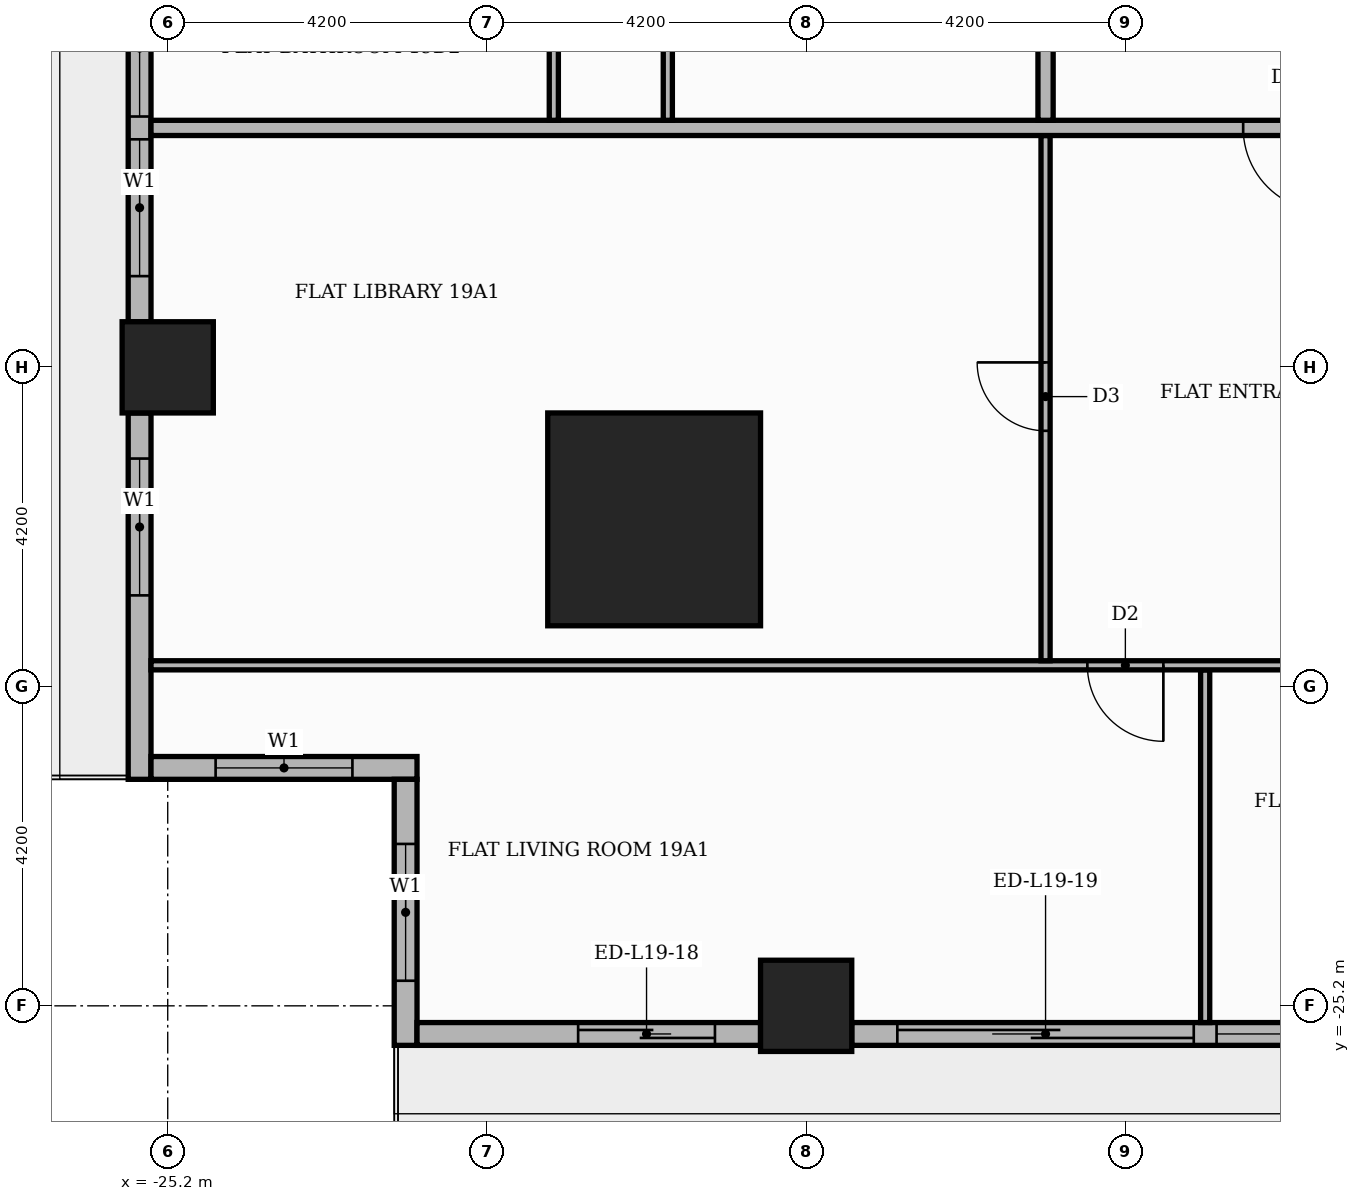
"""IFC4 building model, lengths in metres.
Left out: names, types, materials, properties, quantities, classifications, styles, units other than length and angle.
Written with IfcOpenShell. Run it as: python <this file> out.ifc"""

import sys

from ifc_helpers import new_model, si_unit, direction, frame, frame_2d, origin, origin_2d, place, context, subcontext, project, spatial, rectangle, extrude, element, fill, save


model = new_model("IFC4")
c1 = context("Model", 3, precision=1e-05, world=origin(), true_north=direction((0.0, 1.0)))
c2 = subcontext(c1, "Body", "Model", "MODEL_VIEW")
j1 = project(units=[si_unit("LENGTHUNIT", "METRE"), si_unit("PLANEANGLEUNIT", "RADIAN")], contexts=[c1])
p1 = place(None, origin())
s1 = spatial("IfcSite", under=j1, at=p1, CompositionType="ELEMENT")
p2 = place(p1, origin())
s2 = spatial("IfcBuilding", under=s1, at=p2, CompositionType="ELEMENT")
p3 = place(p2, frame((0.0, 0.0, 83.1)))
s3 = spatial("IfcBuildingStorey", under=s2, at=p3, CompositionType="ELEMENT", Elevation=83.1)
p4 = place(p3, frame((-18.8, -18.8, 0.0), z_axis=(0.0, 0.0, 1.0), x_axis=(1.0, 0.0, 0.0)))
e1 = element("IfcColumn", 1, at=p4, inside=s3, PredefinedType="COLUMN", context=c2, shape_type="SweptSolid", body=[
    extrude(rectangle(XDim=2.8, YDim=2.8, at=origin_2d()), origin(), (0.0, 0.0, 1.0), 3.9),
])
for number, where, z_axis, x_axis in (
    (2, (-16.8, -25.2, 0.0), (0.0, 0.0, 1.0), (1.0, 0.0, 0.0)),
    (3, (-25.2, -16.8, 0.0), (0.0, 0.0, 1.0), (1.0, 0.0, 0.0)),
):
    element("IfcColumn", number, at=place(p3, frame(where, z_axis=z_axis, x_axis=x_axis)), inside=s3, PredefinedType="COLUMN", context=c2, shape_type="SweptSolid", body=[
        extrude(rectangle(XDim=1.2, YDim=1.2, at=origin_2d()), origin(), (0.0, 0.0, 1.0), 3.9),
    ])
p5 = place(p3, frame((-25.57, -9.0, 0.0), z_axis=(0.0, 0.0, 1.0), x_axis=(0.0, -1.0, 0.0)))
e4 = element("IfcWall", 4, at=p5, inside=s3, PredefinedType="STANDARD", context=c2, shape_type="SweptSolid", body=[
    extrude(rectangle(XDim=7.2, YDim=0.3, at=frame_2d((3.6, 0.0))), origin(), (0.0, 0.0, 1.0), 3.48),
])
p6 = place(p5, frame((0.6, 0.0, 0.9)))
e5 = element("IfcOpeningElement", 5, at=p6, cuts=e4, PredefinedType="OPENING", context=c2, shape_type="SweptSolid", body=[
    extrude(rectangle(XDim=1.8, YDim=2.1, at=frame_2d((0.9, 1.05))), frame((0.0, 0.16, 0.0), z_axis=(0.0, -1.0, 0.0), x_axis=(1.0, 0.0, 0.0)), (0.0, 0.0, 1.0), 0.32),
])
p7 = place(p5, frame((2.7, 0.0, 0.9)))
e6 = element("IfcOpeningElement", 6, at=p7, cuts=e4, PredefinedType="OPENING", context=c2, shape_type="SweptSolid", body=[
    extrude(rectangle(XDim=1.8, YDim=2.1, at=frame_2d((0.9, 1.05))), frame((0.0, 0.16, 0.0), z_axis=(0.0, -1.0, 0.0), x_axis=(1.0, 0.0, 0.0)), (0.0, 0.0, 1.0), 0.32),
])
p8 = place(p5, frame((4.8, 0.0, 0.9)))
e7 = element("IfcOpeningElement", 7, at=p8, cuts=e4, PredefinedType="OPENING", context=c2, shape_type="SweptSolid", body=[
    extrude(rectangle(XDim=1.8, YDim=2.1, at=frame_2d((0.9, 1.05))), frame((0.0, 0.16, 0.0), z_axis=(0.0, -1.0, 0.0), x_axis=(1.0, 0.0, 0.0)), (0.0, 0.0, 1.0), 0.32),
])
p9 = place(p3, frame((-25.57, -17.4, 0.0), z_axis=(0.0, 0.0, 1.0), x_axis=(0.0, -1.0, 0.0)))
e8 = element("IfcWall", 8, at=p9, inside=s3, PredefinedType="STANDARD", context=c2, shape_type="SweptSolid", body=[
    extrude(rectangle(XDim=4.82, YDim=0.3, at=frame_2d((2.41, 0.0))), origin(), (0.0, 0.0, 1.0), 3.48),
])
p10 = place(p9, frame((0.6, 0.0, 0.9)))
e9 = element("IfcOpeningElement", 9, at=p10, cuts=e8, PredefinedType="OPENING", context=c2, shape_type="SweptSolid", body=[
    extrude(rectangle(XDim=1.8, YDim=2.1, at=frame_2d((0.9, 1.05))), frame((0.0, 0.16, 0.0), z_axis=(0.0, -1.0, 0.0), x_axis=(1.0, 0.0, 0.0)), (0.0, 0.0, 1.0), 0.32),
])
p11 = place(p3, frame((-25.42, -22.07, 0.0), z_axis=(0.0, 0.0, 1.0), x_axis=(1.0, 0.0, 0.0)))
e10 = element("IfcWall", 10, at=p11, inside=s3, PredefinedType="STANDARD", context=c2, shape_type="SweptSolid", body=[
    extrude(rectangle(XDim=3.5, YDim=0.3, at=frame_2d((1.75, 0.0))), origin(), (0.0, 0.0, 1.0), 3.48),
])
p12 = place(p11, frame((0.85, 0.0, 0.9)))
e11 = element("IfcOpeningElement", 11, at=p12, cuts=e10, PredefinedType="OPENING", context=c2, shape_type="SweptSolid", body=[
    extrude(rectangle(XDim=1.8, YDim=2.1, at=frame_2d((0.9, 1.05))), frame((0.0, 0.16, 0.0), z_axis=(0.0, -1.0, 0.0), x_axis=(1.0, 0.0, 0.0)), (0.0, 0.0, 1.0), 0.32),
])
p13 = place(p3, frame((-22.07, -22.22, 0.0), z_axis=(0.0, 0.0, 1.0), x_axis=(0.0, -1.0, 0.0)))
e12 = element("IfcWall", 12, at=p13, inside=s3, PredefinedType="STANDARD", context=c2, shape_type="SweptSolid", body=[
    extrude(rectangle(XDim=3.5, YDim=0.3, at=frame_2d((1.75, 0.0))), origin(), (0.0, 0.0, 1.0), 3.48),
])
p14 = place(p13, frame((0.85, 0.0, 0.9)))
e13 = element("IfcOpeningElement", 13, at=p14, cuts=e12, PredefinedType="OPENING", context=c2, shape_type="SweptSolid", body=[
    extrude(rectangle(XDim=1.8, YDim=2.1, at=frame_2d((0.9, 1.05))), frame((0.0, 0.16, 0.0), z_axis=(0.0, -1.0, 0.0), x_axis=(1.0, 0.0, 0.0)), (0.0, 0.0, 1.0), 0.32),
])
p15 = place(p3, frame((-21.92, -25.57, 0.0), z_axis=(0.0, 0.0, 1.0), x_axis=(1.0, 0.0, 0.0)))
e14 = element("IfcWall", 14, at=p15, inside=s3, PredefinedType="STANDARD", context=c2, shape_type="SweptSolid", body=[
    extrude(rectangle(XDim=4.52, YDim=0.3, at=frame_2d((2.26, 0.0))), origin(), (0.0, 0.0, 1.0), 3.48),
])
p16 = place(p15, frame((2.12, 0.0, 0.0)))
e15 = element("IfcOpeningElement", 15, at=p16, cuts=e14, PredefinedType="OPENING", context=c2, shape_type="SweptSolid", body=[
    extrude(rectangle(XDim=1.8, YDim=2.4, at=frame_2d((0.9, 1.2))), frame((0.0, 0.16, 0.0), z_axis=(0.0, -1.0, 0.0), x_axis=(1.0, 0.0, 0.0)), (0.0, 0.0, 1.0), 0.32),
])
p17 = place(p3, frame((-16.2, -25.57, 0.0), z_axis=(0.0, 0.0, 1.0), x_axis=(1.0, 0.0, 0.0)))
e16 = element("IfcWall", 16, at=p17, inside=s3, PredefinedType="STANDARD", context=c2, shape_type="SweptSolid", body=[
    extrude(rectangle(XDim=7.2, YDim=0.3, at=frame_2d((3.6, 0.0))), origin(), (0.0, 0.0, 1.0), 3.48),
])
p18 = place(p17, frame((0.6, 0.0, 0.0)))
e17 = element("IfcOpeningElement", 17, at=p18, cuts=e16, PredefinedType="OPENING", context=c2, shape_type="SweptSolid", body=[
    extrude(rectangle(XDim=3.9, YDim=2.4, at=frame_2d((1.95, 1.2))), frame((0.0, 0.16, 0.0), z_axis=(0.0, -1.0, 0.0), x_axis=(1.0, 0.0, 0.0)), (0.0, 0.0, 1.0), 0.32),
])
p19 = place(p17, frame((4.8, 0.0, 0.9)))
e18 = element("IfcOpeningElement", 18, at=p19, cuts=e16, PredefinedType="OPENING", context=c2, shape_type="SweptSolid", body=[
    extrude(rectangle(XDim=1.8, YDim=2.1, at=frame_2d((0.9, 1.05))), frame((0.0, 0.16, 0.0), z_axis=(0.0, -1.0, 0.0), x_axis=(1.0, 0.0, 0.0)), (0.0, 0.0, 1.0), 0.32),
])
p20 = place(p3, frame((-11.55, -25.42, 0.0), z_axis=(0.0, 0.0, 1.0), x_axis=(0.0, 1.0, 0.0)))
e19 = element("IfcWall", 19, at=p20, inside=s3, PredefinedType="PARTITIONING", context=c2, shape_type="SweptSolid", body=[
    extrude(rectangle(XDim=4.64, YDim=0.12, at=frame_2d((2.32, 0.0))), origin(), (0.0, 0.0, 1.0), 3.48),
])
p21 = place(p3, frame((-25.42, -20.72, 0.0), z_axis=(0.0, 0.0, 1.0), x_axis=(1.0, 0.0, 0.0)))
e20 = element("IfcWall", 20, at=p21, inside=s3, PredefinedType="PARTITIONING", context=c2, shape_type="SweptSolid", body=[
    extrude(rectangle(XDim=38.97, YDim=0.12, at=frame_2d((19.485, 0.0))), origin(), (0.0, 0.0, 1.0), 3.48),
])
p22 = place(p21, frame((12.32, 0.0, 0.0)))
e21 = element("IfcOpeningElement", 21, at=p22, cuts=e20, PredefinedType="OPENING", context=c2, shape_type="SweptSolid", body=[
    extrude(rectangle(XDim=1.0, YDim=2.1, at=frame_2d((0.5, 1.05))), frame((0.0, 0.07, 0.0), z_axis=(0.0, -1.0, 0.0), x_axis=(1.0, 0.0, 0.0)), (0.0, 0.0, 1.0), 0.14),
])
p23 = place(p21, frame((15.52, 0.0, 0.0)))
e22 = element("IfcOpeningElement", 22, at=p23, cuts=e20, PredefinedType="OPENING", context=c2, shape_type="SweptSolid", body=[
    extrude(rectangle(XDim=0.9, YDim=2.1, at=frame_2d((0.45, 1.05))), frame((0.0, 0.07, 0.0), z_axis=(0.0, -1.0, 0.0), x_axis=(1.0, 0.0, 0.0)), (0.0, 0.0, 1.0), 0.14),
])
p24 = place(p21, frame((19.72, 0.0, 0.0)))
e23 = element("IfcOpeningElement", 23, at=p24, cuts=e20, PredefinedType="OPENING", context=c2, shape_type="SweptSolid", body=[
    extrude(rectangle(XDim=0.9, YDim=2.1, at=frame_2d((0.45, 1.05))), frame((0.0, 0.07, 0.0), z_axis=(0.0, -1.0, 0.0), x_axis=(1.0, 0.0, 0.0)), (0.0, 0.0, 1.0), 0.14),
])
p25 = place(p21, frame((28.12, 0.0, 0.0)))
e24 = element("IfcOpeningElement", 24, at=p25, cuts=e20, PredefinedType="OPENING", context=c2, shape_type="SweptSolid", body=[
    extrude(rectangle(XDim=0.9, YDim=2.1, at=frame_2d((0.45, 1.05))), frame((0.0, 0.07, 0.0), z_axis=(0.0, -1.0, 0.0), x_axis=(1.0, 0.0, 0.0)), (0.0, 0.0, 1.0), 0.14),
])
p26 = place(p21, frame((34.42, 0.0, 0.0)))
e25 = element("IfcOpeningElement", 25, at=p26, cuts=e20, PredefinedType="OPENING", context=c2, shape_type="SweptSolid", body=[
    extrude(rectangle(XDim=0.9, YDim=2.1, at=frame_2d((0.45, 1.05))), frame((0.0, 0.07, 0.0), z_axis=(0.0, -1.0, 0.0), x_axis=(1.0, 0.0, 0.0)), (0.0, 0.0, 1.0), 0.14),
])
p27 = place(p3, frame((-13.65, -20.66, 0.0), z_axis=(0.0, 0.0, 1.0), x_axis=(0.0, 1.0, 0.0)))
e26 = element("IfcWall", 26, at=p27, inside=s3, PredefinedType="PARTITIONING", context=c2, shape_type="SweptSolid", body=[
    extrude(rectangle(XDim=6.91, YDim=0.12, at=frame_2d((3.455, 0.0))), origin(), (0.0, 0.0, 1.0), 3.48),
])
p28 = place(p27, frame((3.025, 0.0, 0.0)))
e27 = element("IfcOpeningElement", 27, at=p28, cuts=e26, PredefinedType="OPENING", context=c2, shape_type="SweptSolid", body=[
    extrude(rectangle(XDim=0.9, YDim=2.1, at=frame_2d((0.45, 1.05))), frame((0.0, 0.07, 0.0), z_axis=(0.0, -1.0, 0.0), x_axis=(1.0, 0.0, 0.0)), (0.0, 0.0, 1.0), 0.14),
])
p29 = place(p3, frame((-25.42, -13.65, 0.0), z_axis=(0.0, 0.0, 1.0), x_axis=(1.0, 0.0, 0.0)))
e28 = element("IfcWall", 28, at=p29, inside=s3, PredefinedType="PARTITIONING", context=c2, shape_type="SweptSolid", body=[
    extrude(rectangle(XDim=39.07, YDim=0.2, at=frame_2d((19.535, 0.0))), origin(), (0.0, 0.0, 1.0), 3.48),
])
p30 = place(p29, frame((14.37, 0.0, 0.0)))
e29 = element("IfcOpeningElement", 29, at=p30, cuts=e28, PredefinedType="OPENING", context=c2, shape_type="SweptSolid", body=[
    extrude(rectangle(XDim=1.1, YDim=2.4, at=frame_2d((0.55, 1.2))), frame((0.0, 0.11, 0.0), z_axis=(0.0, -1.0, 0.0), x_axis=(1.0, 0.0, 0.0)), (0.0, 0.0, 1.0), 0.22),
])
p31 = place(p3, frame((-20.12, -13.55, 0.0), z_axis=(0.0, 0.0, 1.0), x_axis=(0.0, 1.0, 0.0)))
e30 = element("IfcWall", 30, at=p31, inside=s3, PredefinedType="PARTITIONING", context=c2, shape_type="SweptSolid", body=[
    extrude(rectangle(XDim=1.94, YDim=0.12, at=frame_2d((0.97, 0.0))), origin(), (0.0, 0.0, 1.0), 3.48),
])
p32 = place(p3, frame((-18.62, -13.55, 0.0), z_axis=(0.0, 0.0, 1.0), x_axis=(0.0, 1.0, 0.0)))
e31 = element("IfcWall", 31, at=p32, inside=s3, PredefinedType="PARTITIONING", context=c2, shape_type="SweptSolid", body=[
    extrude(rectangle(XDim=3.44, YDim=0.12, at=frame_2d((1.72, 0.0))), origin(), (0.0, 0.0, 1.0), 3.48),
])
p33 = place(p32, frame((1.2, 0.0, 0.0)))
e32 = element("IfcOpeningElement", 32, at=p33, cuts=e31, PredefinedType="OPENING", context=c2, shape_type="SweptSolid", body=[
    extrude(rectangle(XDim=1.0, YDim=2.1, at=frame_2d((0.5, 1.05))), frame((0.0, 0.07, 0.0), z_axis=(0.0, -1.0, 0.0), x_axis=(1.0, 0.0, 0.0)), (0.0, 0.0, 1.0), 0.14),
])
p34 = place(p3, frame((-13.65, -13.55, 0.0), z_axis=(0.0, 0.0, 1.0), x_axis=(0.0, 1.0, 0.0)))
e33 = element("IfcWall", 33, at=p34, inside=s3, PredefinedType="PARTITIONING", context=c2, shape_type="SweptSolid", body=[
    extrude(rectangle(XDim=18.7, YDim=0.2, at=frame_2d((9.35, 0.0))), origin(), (0.0, 0.0, 1.0), 3.48),
])
p35 = place(p34, frame((14.05, 0.0, 0.0)))
e34 = element("IfcOpeningElement", 34, at=p35, cuts=e33, PredefinedType="OPENING", context=c2, shape_type="SweptSolid", body=[
    extrude(rectangle(XDim=1.1, YDim=2.4, at=frame_2d((0.55, 1.2))), frame((0.0, 0.11, 0.0), z_axis=(0.0, -1.0, 0.0), x_axis=(1.0, 0.0, 0.0)), (0.0, 0.0, 1.0), 0.22),
])
p36 = place(p7, origin())
e35 = element("IfcWindow", 35, at=p36, inside=s3, PartitioningType="SINGLE_PANEL", PredefinedType="WINDOW", context=c2, shape_type="SweptSolid", body=[
    extrude(rectangle(XDim=1.8, YDim=2.1, at=frame_2d((0.9, 1.05))), frame((0.0, 0.03, 0.0), z_axis=(0.0, -1.0, 0.0), x_axis=(1.0, 0.0, 0.0)), (0.0, 0.0, 1.0), 0.06),
])
fill(e6, e35)
p37 = place(p8, origin())
e36 = element("IfcWindow", 36, at=p37, inside=s3, PartitioningType="SINGLE_PANEL", PredefinedType="WINDOW", context=c2, shape_type="SweptSolid", body=[
    extrude(rectangle(XDim=1.8, YDim=2.1, at=frame_2d((0.9, 1.05))), frame((0.0, 0.03, 0.0), z_axis=(0.0, -1.0, 0.0), x_axis=(1.0, 0.0, 0.0)), (0.0, 0.0, 1.0), 0.06),
])
fill(e7, e36)
p38 = place(p10, origin())
e37 = element("IfcWindow", 37, at=p38, inside=s3, PartitioningType="SINGLE_PANEL", PredefinedType="WINDOW", context=c2, shape_type="SweptSolid", body=[
    extrude(rectangle(XDim=1.8, YDim=2.1, at=frame_2d((0.9, 1.05))), frame((0.0, 0.03, 0.0), z_axis=(0.0, -1.0, 0.0), x_axis=(1.0, 0.0, 0.0)), (0.0, 0.0, 1.0), 0.06),
])
fill(e9, e37)
p39 = place(p12, origin())
e38 = element("IfcWindow", 38, at=p39, inside=s3, PartitioningType="SINGLE_PANEL", PredefinedType="WINDOW", context=c2, shape_type="SweptSolid", body=[
    extrude(rectangle(XDim=1.8, YDim=2.1, at=frame_2d((0.9, 1.05))), frame((0.0, 0.03, 0.0), z_axis=(0.0, -1.0, 0.0), x_axis=(1.0, 0.0, 0.0)), (0.0, 0.0, 1.0), 0.06),
])
fill(e11, e38)
p40 = place(p14, origin())
e39 = element("IfcWindow", 39, at=p40, inside=s3, PartitioningType="SINGLE_PANEL", PredefinedType="WINDOW", context=c2, shape_type="SweptSolid", body=[
    extrude(rectangle(XDim=1.8, YDim=2.1, at=frame_2d((0.9, 1.05))), frame((0.0, 0.03, 0.0), z_axis=(0.0, -1.0, 0.0), x_axis=(1.0, 0.0, 0.0)), (0.0, 0.0, 1.0), 0.06),
])
fill(e13, e39)
p41 = place(p16, origin())
e40 = element("IfcDoor", 40, at=p41, inside=s3, OperationType="SLIDING_TO_RIGHT", PredefinedType="DOOR", context=c2, shape_type="SweptSolid", body=[
    extrude(rectangle(XDim=1.8, YDim=2.4, at=frame_2d((0.9, 1.2))), frame((0.0, 0.025, 0.0), z_axis=(0.0, -1.0, 0.0), x_axis=(1.0, 0.0, 0.0)), (0.0, 0.0, 1.0), 0.05),
])
fill(e15, e40)
p42 = place(p18, origin())
e41 = element("IfcDoor", 41, at=p42, inside=s3, OperationType="SLIDING_TO_LEFT", PredefinedType="DOOR", context=c2, shape_type="SweptSolid", body=[
    extrude(rectangle(XDim=3.9, YDim=2.4, at=frame_2d((1.95, 1.2))), frame((0.0, 0.025, 0.0), z_axis=(0.0, -1.0, 0.0), x_axis=(1.0, 0.0, 0.0)), (0.0, 0.0, 1.0), 0.05),
])
fill(e17, e41)
p43 = place(p19, origin())
e42 = element("IfcWindow", 42, at=p43, inside=s3, PartitioningType="SINGLE_PANEL", PredefinedType="WINDOW", context=c2, shape_type="SweptSolid", body=[
    extrude(rectangle(XDim=1.8, YDim=2.1, at=frame_2d((0.9, 1.05))), frame((0.0, 0.03, 0.0), z_axis=(0.0, -1.0, 0.0), x_axis=(1.0, 0.0, 0.0)), (0.0, 0.0, 1.0), 0.06),
])
fill(e18, e42)
p44 = place(p30, frame((1.1, 0.0, 0.0), z_axis=(0.0, 0.0, 1.0), x_axis=(-1.0, 0.0, 0.0)))
e43 = element("IfcDoor", 43, at=p44, inside=s3, OperationType="SINGLE_SWING_RIGHT", PredefinedType="DOOR", context=c2, shape_type="SweptSolid", body=[
    extrude(rectangle(XDim=1.1, YDim=2.4, at=frame_2d((0.55, 1.2))), frame((0.0, 0.025, 0.0), z_axis=(0.0, -1.0, 0.0), x_axis=(1.0, 0.0, 0.0)), (0.0, 0.0, 1.0), 0.05),
])
fill(e29, e43)
p45 = place(p28, origin())
e44 = element("IfcDoor", 44, at=p45, inside=s3, OperationType="SINGLE_SWING_RIGHT", PredefinedType="DOOR", context=c2, shape_type="SweptSolid", body=[
    extrude(rectangle(XDim=0.9, YDim=2.1, at=frame_2d((0.45, 1.05))), frame((0.0, 0.025, 0.0), z_axis=(0.0, -1.0, 0.0), x_axis=(1.0, 0.0, 0.0)), (0.0, 0.0, 1.0), 0.05),
])
fill(e27, e44)
p46 = place(p22, frame((1.0, 0.0, 0.0), z_axis=(0.0, 0.0, 1.0), x_axis=(-1.0, 0.0, 0.0)))
e45 = element("IfcDoor", 45, at=p46, inside=s3, OperationType="SINGLE_SWING_RIGHT", PredefinedType="DOOR", context=c2, shape_type="SweptSolid", body=[
    extrude(rectangle(XDim=1.0, YDim=2.1, at=frame_2d((0.5, 1.05))), frame((0.0, 0.025, 0.0), z_axis=(0.0, -1.0, 0.0), x_axis=(1.0, 0.0, 0.0)), (0.0, 0.0, 1.0), 0.05),
])
fill(e21, e45)
save(model, sys.argv[1])
